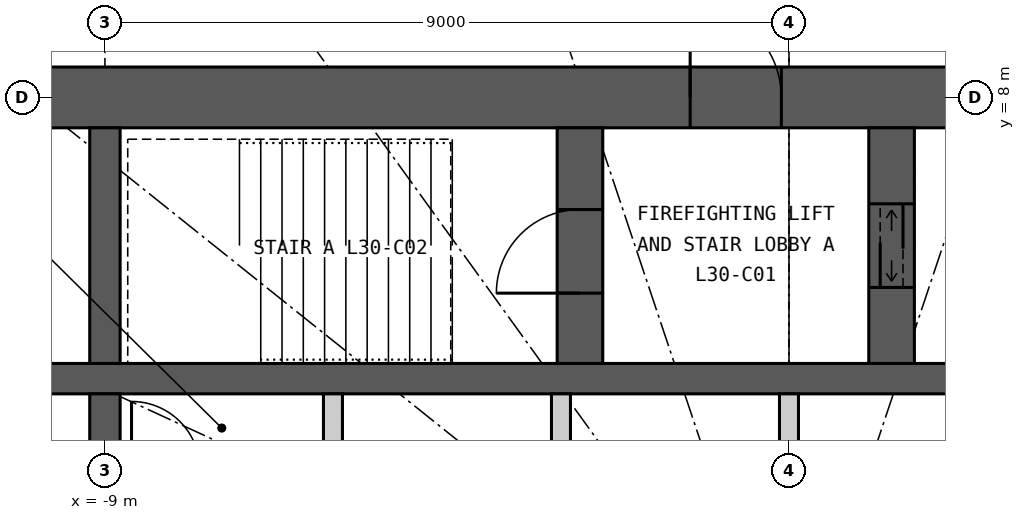
"""IFC4 building model, lengths in metres.
Left out: names, types, materials, properties, quantities, classifications, styles, units other than length and angle.
Written with IfcOpenShell. Run it as: python <this file> out.ifc"""

import sys

from ifc_helpers import new_model, si_unit, direction, frame, frame_2d, origin, place, context, subcontext, project, spatial, rectangle, extrude, element, fill, save


model = new_model("IFC4")
c1 = context("Model", 3, precision=1e-05, world=origin(), true_north=direction((0.0, 1.0)))
c2 = subcontext(c1, "Body", "Model", "MODEL_VIEW")
j1 = project(units=[si_unit("LENGTHUNIT", "METRE"), si_unit("PLANEANGLEUNIT", "RADIAN")], contexts=[c1])
p1 = place(None, origin())
s1 = spatial("IfcSite", under=j1, at=p1, CompositionType="ELEMENT")
p2 = place(p1, origin())
s2 = spatial("IfcBuilding", under=s1, at=p2, CompositionType="ELEMENT")
p3 = place(p2, frame((0.0, 0.0, 118.8)))
s3 = spatial("IfcBuildingStorey", under=s2, at=p3, CompositionType="ELEMENT", Elevation=118.8)
p4 = place(p3, frame((-12.4, 8.0, 0.0), z_axis=(0.0, 0.0, 1.0), x_axis=(1.0, 0.0, 0.0)))
e1 = element("IfcWall", 1, at=p4, inside=s3, PredefinedType="SHEAR", context=c2, shape_type="SweptSolid", body=[
    extrude(rectangle(XDim=24.8, YDim=0.8, at=frame_2d((12.4, 0.0))), origin(), (0.0, 0.0, 1.0), 3.3),
])
p5 = place(p4, frame((11.1, 0.0, 0.0)))
e2 = element("IfcOpeningElement", 2, at=p5, cuts=e1, PredefinedType="OPENING", context=c2, shape_type="SweptSolid", body=[
    extrude(rectangle(XDim=1.2, YDim=2.2, at=frame_2d((0.6, 1.1))), frame((0.0, 0.41, 0.0), z_axis=(0.0, -1.0, 0.0), x_axis=(1.0, 0.0, 0.0)), (0.0, 0.0, 1.0), 0.82),
])
p6 = place(p4, frame((18.7, 0.0, 0.0)))
e3 = element("IfcOpeningElement", 3, at=p6, cuts=e1, PredefinedType="OPENING", context=c2, shape_type="SweptSolid", body=[
    extrude(rectangle(XDim=0.9, YDim=2.2, at=frame_2d((0.45, 1.1))), frame((0.0, 0.41, 0.0), z_axis=(0.0, -1.0, 0.0), x_axis=(1.0, 0.0, 0.0)), (0.0, 0.0, 1.0), 0.82),
])
p7 = place(p3, frame((-11.6, 4.3, 0.0), z_axis=(0.0, 0.0, 1.0), x_axis=(1.0, 0.0, 0.0)))
e4 = element("IfcWall", 4, at=p7, inside=s3, PredefinedType="SHEAR", context=c2, shape_type="SweptSolid", body=[
    extrude(rectangle(XDim=23.2, YDim=0.4, at=frame_2d((11.6, 0.0))), origin(), (0.0, 0.0, 1.0), 3.3),
])
p8 = place(p3, frame((-9.0, 4.5, 0.0), z_axis=(0.0, 0.0, 1.0), x_axis=(0.0, 1.0, 0.0)))
e5 = element("IfcWall", 5, at=p8, inside=s3, PredefinedType="SHEAR", context=c2, shape_type="SweptSolid", body=[
    extrude(rectangle(XDim=3.1, YDim=0.4, at=frame_2d((1.55, 0.0))), origin(), (0.0, 0.0, 1.0), 3.3),
])
p9 = place(p3, frame((-9.0, 1.75, 0.0), z_axis=(0.0, 0.0, 1.0), x_axis=(0.0, 1.0, 0.0)))
e6 = element("IfcWall", 6, at=p9, inside=s3, PredefinedType="SHEAR", context=c2, shape_type="SweptSolid", body=[
    extrude(rectangle(XDim=2.35, YDim=0.4, at=frame_2d((1.175, 0.0))), origin(), (0.0, 0.0, 1.0), 3.3),
])
p10 = place(p3, frame((-2.75, 4.5, 0.0), z_axis=(0.0, 0.0, 1.0), x_axis=(0.0, 1.0, 0.0)))
e7 = element("IfcWall", 7, at=p10, inside=s3, PredefinedType="SHEAR", context=c2, shape_type="SweptSolid", body=[
    extrude(rectangle(XDim=3.1, YDim=0.6, at=frame_2d((1.55, 0.0))), origin(), (0.0, 0.0, 1.0), 3.3),
])
p11 = place(p10, frame((0.925, 0.0, 0.0)))
e8 = element("IfcOpeningElement", 8, at=p11, cuts=e7, PredefinedType="OPENING", context=c2, shape_type="SweptSolid", body=[
    extrude(rectangle(XDim=1.1, YDim=2.2, at=frame_2d((0.55, 1.1))), frame((0.0, 0.31, 0.0), z_axis=(0.0, -1.0, 0.0), x_axis=(1.0, 0.0, 0.0)), (0.0, 0.0, 1.0), 0.62),
])
p12 = place(p3, frame((1.35, 4.5, 0.0), z_axis=(0.0, 0.0, 1.0), x_axis=(0.0, 1.0, 0.0)))
e9 = element("IfcWall", 9, at=p12, inside=s3, PredefinedType="SHEAR", context=c2, shape_type="SweptSolid", body=[
    extrude(rectangle(XDim=3.1, YDim=0.6, at=frame_2d((1.55, 0.0))), origin(), (0.0, 0.0, 1.0), 3.3),
])
p13 = place(p12, frame((1.0, 0.0, 0.0)))
e10 = element("IfcOpeningElement", 10, at=p13, cuts=e9, PredefinedType="OPENING", context=c2, shape_type="SweptSolid", body=[
    extrude(rectangle(XDim=1.1, YDim=2.2, at=frame_2d((0.55, 1.1))), frame((0.0, 0.31, 0.0), z_axis=(0.0, -1.0, 0.0), x_axis=(1.0, 0.0, 0.0)), (0.0, 0.0, 1.0), 0.62),
])
for number, where, z_axis, x_axis in (
    (11, (-6.0, 1.75, 0.0), (0.0, 0.0, 1.0), (0.0, 1.0, 0.0)),
    (12, (-3.0, 1.75, 0.0), (0.0, 0.0, 1.0), (0.0, 1.0, 0.0)),
    (13, (0.0, 1.75, 0.0), (0.0, 0.0, 1.0), (0.0, 1.0, 0.0)),
):
    element("IfcWall", number, at=place(p3, frame(where, z_axis=z_axis, x_axis=x_axis)), inside=s3, PredefinedType="PARTITIONING", context=c2, shape_type="SweptSolid", body=[
        extrude(rectangle(XDim=2.35, YDim=0.25, at=frame_2d((1.175, 0.0))), origin(), (0.0, 0.0, 1.0), 3.3),
    ])
p14 = place(p5, origin())
e14 = element("IfcDoor", 14, at=p14, inside=s3, OperationType="SINGLE_SWING_LEFT", PredefinedType="DOOR", context=c2, shape_type="SweptSolid", body=[
    extrude(rectangle(XDim=1.2, YDim=2.2, at=frame_2d((0.6, 1.1))), frame((0.0, 0.025, 0.0), z_axis=(0.0, -1.0, 0.0), x_axis=(1.0, 0.0, 0.0)), (0.0, 0.0, 1.0), 0.05),
])
fill(e2, e14)
p15 = place(p11, origin())
e15 = element("IfcDoor", 15, at=p15, inside=s3, OperationType="SINGLE_SWING_LEFT", PredefinedType="DOOR", context=c2, shape_type="SweptSolid", body=[
    extrude(rectangle(XDim=1.1, YDim=2.2, at=frame_2d((0.55, 1.1))), frame((0.0, 0.025, 0.0), z_axis=(0.0, -1.0, 0.0), x_axis=(1.0, 0.0, 0.0)), (0.0, 0.0, 1.0), 0.05),
])
fill(e8, e15)
p16 = place(p13, origin())
e16 = element("IfcDoor", 16, at=p16, inside=s3, OperationType="DOUBLE_DOOR_SLIDING", PredefinedType="DOOR", context=c2, shape_type="SweptSolid", body=[
    extrude(rectangle(XDim=1.1, YDim=2.2, at=frame_2d((0.55, 1.1))), frame((0.0, 0.025, 0.0), z_axis=(0.0, -1.0, 0.0), x_axis=(1.0, 0.0, 0.0)), (0.0, 0.0, 1.0), 0.05),
])
fill(e10, e16)
save(model, sys.argv[1])
